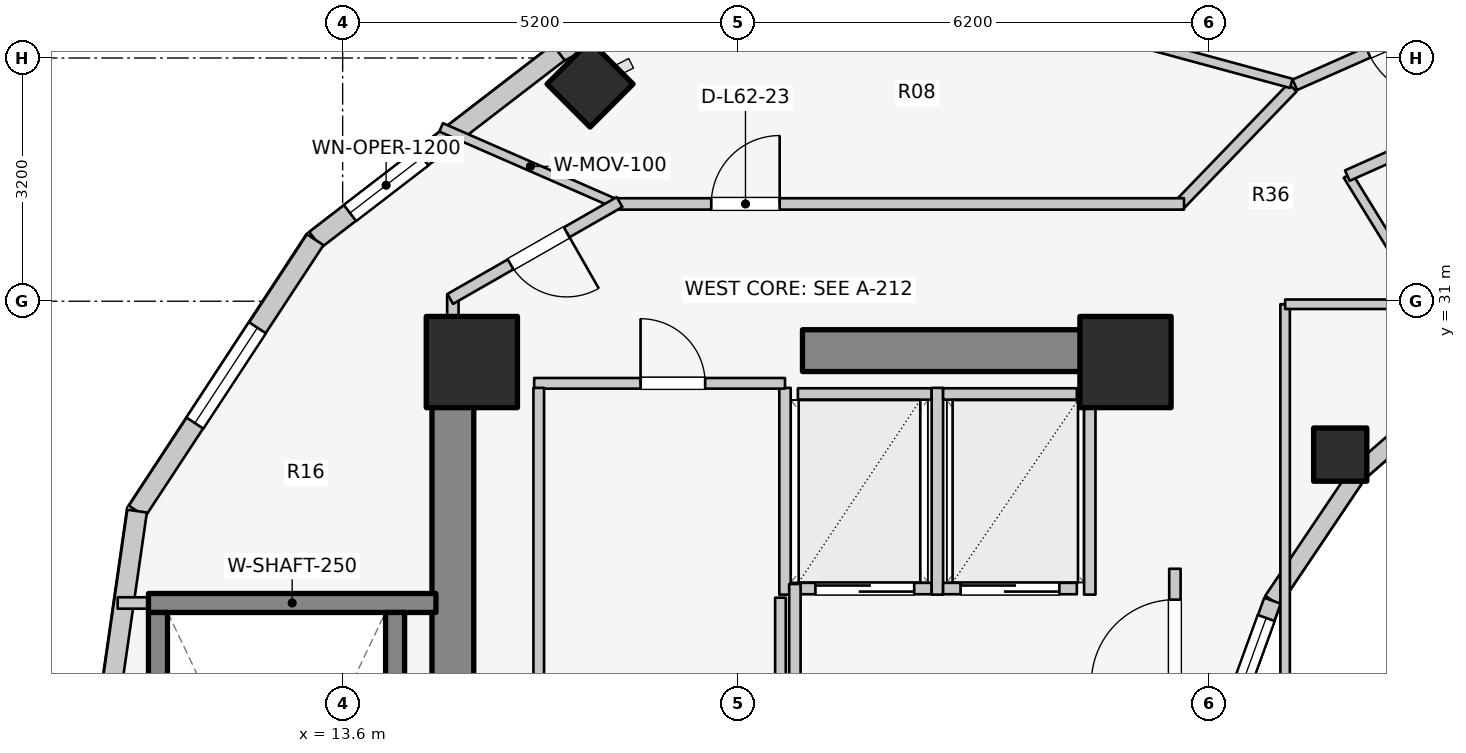
"""IFC4 building model, lengths in metres.
Left out: names, types, materials, properties, quantities, classifications, styles, units other than length and angle.
Written with IfcOpenShell. Run it as: python <this file> out.ifc"""

import sys

from ifc_helpers import new_model, si_unit, direction, frame, frame_2d, origin, origin_2d, place, context, subcontext, project, spatial, rectangle, extrude, element, fill, save


model = new_model("IFC4")
c1 = context("Model", 3, precision=1e-05, world=origin(), true_north=direction((0.0, 1.0)))
c2 = subcontext(c1, "Body", "Model", "MODEL_VIEW")
j1 = project(units=[si_unit("LENGTHUNIT", "METRE"), si_unit("PLANEANGLEUNIT", "RADIAN")], contexts=[c1])
p1 = place(None, origin())
s1 = spatial("IfcSite", under=j1, at=p1, CompositionType="ELEMENT")
p2 = place(p1, origin())
s2 = spatial("IfcBuilding", under=s1, at=p2, CompositionType="ELEMENT")
p3 = place(p2, frame((0.0, 0.0, 204.7)))
s3 = spatial("IfcBuildingStorey", under=s2, at=p3, CompositionType="ELEMENT", Elevation=204.7)
p4 = place(p3, frame((15.05, 17.05, 0.0), z_axis=(0.0, 0.0, 1.0), x_axis=(0.0, 1.0, 0.0)))
e1 = element("IfcWall", 1, at=p4, inside=s3, PredefinedType="SHEAR", context=c2, shape_type="SweptSolid", body=[
    extrude(rectangle(XDim=12.8, YDim=0.55, at=frame_2d((6.4, 0.0))), origin(), (0.0, 0.0, 1.0), 3.1),
])
p5 = place(p3, frame((19.65, 30.35, 0.0), z_axis=(0.0, 0.0, 1.0), x_axis=(1.0, 0.0, 0.0)))
e2 = element("IfcWall", 2, at=p5, inside=s3, PredefinedType="SHEAR", context=c2, shape_type="SweptSolid", body=[
    extrude(rectangle(XDim=4.5, YDim=0.55, at=frame_2d((2.25, 0.0))), origin(), (0.0, 0.0, 1.0), 3.1),
])
p6 = place(p3, frame((11.045, 27.03, 0.0), z_axis=(0.0, 0.0, 1.0), x_axis=(1.0, 0.0, 0.0)))
e3 = element("IfcWall", 3, at=p6, inside=s3, PredefinedType="SOLIDWALL", context=c2, shape_type="SweptSolid", body=[
    extrude(rectangle(XDim=3.782, YDim=0.25, at=frame_2d((1.891, 0.0))), origin(), (0.0, 0.0, 1.0), 3.1),
])
for number, where, z_axis, x_axis in (
    (4, (11.17, 19.095, 0.0), (0.0, 0.0, 1.0), (0.0, 1.0, 0.0)),
    (5, (14.29, 19.095, 0.0), (0.0, 0.0, 1.0), (0.0, 1.0, 0.0)),
):
    element("IfcWall", number, at=place(p3, frame(where, z_axis=z_axis, x_axis=x_axis)), inside=s3, PredefinedType="SOLIDWALL", context=c2, shape_type="SweptSolid", body=[
        extrude(rectangle(XDim=7.81, YDim=0.25, at=frame_2d((3.905, 0.0))), origin(), (0.0, 0.0, 1.0), 3.1),
    ])
for number, where, z_axis, x_axis in (
    (6, (23.9, 30.2, 0.0), (0.0, 0.0, 1.0), (1.0, 0.0, 0.0)),
    (7, (15.3, 30.2, 0.0), (0.0, 0.0, 1.0), (1.0, 0.0, 0.0)),
):
    element("IfcColumn", number, at=place(p3, frame(where, z_axis=z_axis, x_axis=x_axis)), inside=s3, PredefinedType="COLUMN", context=c2, shape_type="SweptSolid", body=[
        extrude(rectangle(XDim=1.2, YDim=1.2, at=origin_2d()), origin(), (0.0, 0.0, 1.0), 3.1),
    ])
p7 = place(p3, frame((26.725, 28.982, 0.0), z_axis=(0.0, 0.0, 1.0), x_axis=(1.0, 0.0, 0.0)))
e8 = element("IfcColumn", 8, at=p7, inside=s3, PredefinedType="COLUMN", context=c2, shape_type="SweptSolid", body=[
    extrude(rectangle(XDim=0.7, YDim=0.7, at=origin_2d()), origin(), (0.0, 0.0, 1.0), 3.1),
])
p8 = place(p3, frame((16.855, 33.857, 0.0), z_axis=(0.0, 0.0, 1.0), x_axis=(-0.707106781187, 0.707106781187, 0.0)))
e9 = element("IfcColumn", 9, at=p8, inside=s3, PredefinedType="COLUMN", context=c2, shape_type="SweptSolid", body=[
    extrude(rectangle(XDim=0.8, YDim=0.8, at=origin_2d()), origin(), (0.0, 0.0, 1.0), 3.1),
])
p9 = place(p3, frame((28.44, 30.032, 0.0), z_axis=(0.0, 0.0, 1.0), x_axis=(-0.752576694707, -0.658504607869, 0.0)))
e10 = element("IfcWall", 10, at=p9, inside=s3, PredefinedType="STANDARD", context=c2, shape_type="SweptSolid", body=[
    extrude(rectangle(XDim=1.959, YDim=0.23, at=frame_2d((0.98, 0.0))), origin(), (0.0, 0.0, 1.0), 2.16),
])
p10 = place(p3, frame((26.965, 28.742, 0.0), z_axis=(0.0, 0.0, 1.0), x_axis=(-0.558197800898, -0.829707909492, 0.0)))
e11 = element("IfcWall", 11, at=p10, inside=s3, PredefinedType="STANDARD", context=c2, shape_type="SweptSolid", body=[
    extrude(rectangle(XDim=2.027, YDim=0.23, at=frame_2d((1.013, 0.0))), origin(), (0.0, 0.0, 1.0), 2.16),
])
p11 = place(p3, frame((25.834, 27.06, 0.0), z_axis=(0.0, 0.0, 1.0), x_axis=(-0.341423187295, -0.93990968033, 0.0)))
e12 = element("IfcWall", 12, at=p11, inside=s3, PredefinedType="STANDARD", context=c2, shape_type="SweptSolid", body=[
    extrude(rectangle(XDim=2.084, YDim=0.23, at=frame_2d((1.042, 0.0))), origin(), (0.0, 0.0, 1.0), 2.84),
])
p12 = place(p11, frame((0.242, 0.0, 0.85)))
e13 = element("IfcOpeningElement", 13, at=p12, cuts=e12, PredefinedType="OPENING", context=c2, shape_type="SweptSolid", body=[
    extrude(rectangle(XDim=1.6, YDim=1.65, at=frame_2d((0.8, 0.825))), frame((0.0, 0.125, 0.0), z_axis=(0.0, -1.0, 0.0), x_axis=(1.0, 0.0, 0.0)), (0.0, 0.0, 1.0), 0.25),
])
p13 = place(p3, frame((20.13, 36.177, 0.0), z_axis=(0.0, 0.0, 1.0), x_axis=(-0.88849146803, -0.458893137057, 0.0)))
e14 = element("IfcWall", 14, at=p13, inside=s3, PredefinedType="STANDARD", context=c2, shape_type="SweptSolid", body=[
    extrude(rectangle(XDim=4.15, YDim=0.26, at=frame_2d((2.075, 0.0))), origin(), (0.0, 0.0, 1.0), 2.85),
])
p14 = place(p3, frame((16.442, 34.272, 0.0), z_axis=(0.0, 0.0, 1.0), x_axis=(-0.792713817907, -0.609593965603, 0.0)))
e15 = element("IfcWall", 15, at=p14, inside=s3, PredefinedType="STANDARD", context=c2, shape_type="SweptSolid", body=[
    extrude(rectangle(XDim=4.041, YDim=0.26, at=frame_2d((2.021, 0.0))), origin(), (0.0, 0.0, 1.0), 2.85),
])
p15 = place(p14, frame((2.264, 0.0, 0.75)))
e16 = element("IfcOpeningElement", 16, at=p15, cuts=e15, PredefinedType="OPENING", context=c2, shape_type="SweptSolid", body=[
    extrude(rectangle(XDim=1.2, YDim=1.5, at=frame_2d((0.6, 0.75))), frame((0.0, 0.14, 0.0), z_axis=(0.0, -1.0, 0.0), x_axis=(1.0, 0.0, 0.0)), (0.0, 0.0, 1.0), 0.28),
])
p16 = place(p3, frame((13.239, 31.809, 0.0), z_axis=(0.0, 0.0, 1.0), x_axis=(-0.548776305075, -0.835969238064, 0.0)))
e17 = element("IfcWall", 17, at=p16, inside=s3, PredefinedType="STANDARD", context=c2, shape_type="SweptSolid", body=[
    extrude(rectangle(XDim=4.271, YDim=0.26, at=frame_2d((2.135, 0.0))), origin(), (0.0, 0.0, 1.0), 2.85),
])
p17 = place(p16, frame((1.385, 0.0, 0.75)))
e18 = element("IfcOpeningElement", 18, at=p17, cuts=e17, PredefinedType="OPENING", context=c2, shape_type="SweptSolid", body=[
    extrude(rectangle(XDim=1.5, YDim=1.6, at=frame_2d((0.75, 0.8))), frame((0.0, 0.14, 0.0), z_axis=(0.0, -1.0, 0.0), x_axis=(1.0, 0.0, 0.0)), (0.0, 0.0, 1.0), 0.28),
])
p18 = place(p3, frame((10.895, 28.239, 0.0), z_axis=(0.0, 0.0, 1.0), x_axis=(-0.142712754019, -0.989764148593, 0.0)))
e19 = element("IfcWall", 19, at=p18, inside=s3, PredefinedType="STANDARD", context=c2, shape_type="SweptSolid", body=[
    extrude(rectangle(XDim=5.293, YDim=0.26, at=frame_2d((2.646, 0.0))), origin(), (0.0, 0.0, 1.0), 2.85),
])
p19 = place(p18, frame((2.635, 0.0, 0.75)))
e20 = element("IfcOpeningElement", 20, at=p19, cuts=e19, PredefinedType="OPENING", context=c2, shape_type="SweptSolid", body=[
    extrude(rectangle(XDim=1.2, YDim=1.5, at=frame_2d((0.6, 0.75))), frame((0.0, 0.14, 0.0), z_axis=(0.0, -1.0, 0.0), x_axis=(1.0, 0.0, 0.0)), (0.0, 0.0, 1.0), 0.28),
])
p20 = place(p3, frame((19.59, 27.22, 0.0), z_axis=(0.0, 0.0, 1.0), x_axis=(1.0, 0.0, 0.0)))
e21 = element("IfcWall", 21, at=p20, inside=s3, PredefinedType="SOLIDWALL", context=c2, shape_type="SweptSolid", body=[
    extrude(rectangle(XDim=1.76, YDim=0.15, at=frame_2d((0.88, 0.0))), origin(), (0.0, 0.0, 1.0), 2.855),
])
p21 = place(p20, frame((0.23, 0.0, 0.0)))
e22 = element("IfcOpeningElement", 22, at=p21, cuts=e21, PredefinedType="OPENING", context=c2, shape_type="SweptSolid", body=[
    extrude(rectangle(XDim=1.3, YDim=2.1, at=frame_2d((0.65, 1.05))), frame((0.0, 0.085, 0.0), z_axis=(0.0, -1.0, 0.0), x_axis=(1.0, 0.0, 0.0)), (0.0, 0.0, 1.0), 0.17),
])
p22 = place(p3, frame((19.59, 29.78, 0.0), z_axis=(0.0, 0.0, 1.0), x_axis=(1.0, 0.0, 0.0)))
e23 = element("IfcWall", 23, at=p22, inside=s3, PredefinedType="SOLIDWALL", context=c2, shape_type="SweptSolid", body=[
    extrude(rectangle(XDim=1.76, YDim=0.15, at=frame_2d((0.88, 0.0))), origin(), (0.0, 0.0, 1.0), 2.855),
])
for number, where, z_axis, x_axis in (
    (24, (19.42, 27.14, 0.0), (0.0, 0.0, 1.0), (0.0, 1.0, 0.0)),
    (25, (21.425, 27.14, 0.0), (0.0, 0.0, 1.0), (0.0, 1.0, 0.0)),
):
    element("IfcWall", number, at=place(p3, frame(where, z_axis=z_axis, x_axis=x_axis)), inside=s3, PredefinedType="SOLIDWALL", context=c2, shape_type="SweptSolid", body=[
        extrude(rectangle(XDim=2.72, YDim=0.15, at=frame_2d((1.36, 0.0))), origin(), (0.0, 0.0, 1.0), 2.855),
    ])
p23 = place(p3, frame((21.5, 27.22, 0.0), z_axis=(0.0, 0.0, 1.0), x_axis=(1.0, 0.0, 0.0)))
e26 = element("IfcWall", 26, at=p23, inside=s3, PredefinedType="SOLIDWALL", context=c2, shape_type="SweptSolid", body=[
    extrude(rectangle(XDim=1.76, YDim=0.15, at=frame_2d((0.88, 0.0))), origin(), (0.0, 0.0, 1.0), 2.855),
])
p24 = place(p23, frame((0.23, 0.0, 0.0)))
e27 = element("IfcOpeningElement", 27, at=p24, cuts=e26, PredefinedType="OPENING", context=c2, shape_type="SweptSolid", body=[
    extrude(rectangle(XDim=1.3, YDim=2.1, at=frame_2d((0.65, 1.05))), frame((0.0, 0.085, 0.0), z_axis=(0.0, -1.0, 0.0), x_axis=(1.0, 0.0, 0.0)), (0.0, 0.0, 1.0), 0.17),
])
p25 = place(p3, frame((21.5, 29.78, 0.0), z_axis=(0.0, 0.0, 1.0), x_axis=(1.0, 0.0, 0.0)))
e28 = element("IfcWall", 28, at=p25, inside=s3, PredefinedType="SOLIDWALL", context=c2, shape_type="SweptSolid", body=[
    extrude(rectangle(XDim=1.76, YDim=0.15, at=frame_2d((0.88, 0.0))), origin(), (0.0, 0.0, 1.0), 2.855),
])
p26 = place(p3, frame((23.43, 27.14, 0.0), z_axis=(0.0, 0.0, 1.0), x_axis=(0.0, 1.0, 0.0)))
e29 = element("IfcWall", 29, at=p26, inside=s3, PredefinedType="SOLIDWALL", context=c2, shape_type="SweptSolid", body=[
    extrude(rectangle(XDim=2.72, YDim=0.15, at=frame_2d((1.36, 0.0))), origin(), (0.0, 0.0, 1.0), 2.855),
])
p27 = place(p3, frame((19.55, 24.08, 0.0), z_axis=(0.0, 0.0, 1.0), x_axis=(0.0, 1.0, 0.0)))
e30 = element("IfcWall", 30, at=p27, inside=s3, PredefinedType="PARTITIONING", context=c2, shape_type="SweptSolid", body=[
    extrude(rectangle(XDim=3.2, YDim=0.15, at=frame_2d((1.6, 0.0))), origin(), (0.0, 0.0, 1.0), 2.855),
])
p28 = place(p3, frame((24.55, 24.08, 0.0), z_axis=(0.0, 0.0, 1.0), x_axis=(0.0, 1.0, 0.0)))
e31 = element("IfcWall", 31, at=p28, inside=s3, PredefinedType="PARTITIONING", context=c2, shape_type="SweptSolid", body=[
    extrude(rectangle(XDim=3.4, YDim=0.15, at=frame_2d((1.7, 0.0))), origin(), (0.0, 0.0, 1.0), 2.855),
])
p29 = place(p28, frame((1.894, 0.0, 0.0)))
e32 = element("IfcOpeningElement", 32, at=p29, cuts=e31, PredefinedType="OPENING", context=c2, shape_type="SweptSolid", body=[
    extrude(rectangle(XDim=1.1, YDim=2.1, at=frame_2d((0.55, 1.05))), frame((0.0, 0.085, 0.0), z_axis=(0.0, -1.0, 0.0), x_axis=(1.0, 0.0, 0.0)), (0.0, 0.0, 1.0), 0.17),
])
p30 = place(p3, frame((16.12, 29.92, 0.0), z_axis=(0.0, 0.0, 1.0), x_axis=(1.0, 0.0, 0.0)))
e33 = element("IfcWall", 33, at=p30, inside=s3, PredefinedType="PLUMBINGWALL", context=c2, shape_type="SweptSolid", body=[
    extrude(rectangle(XDim=3.3, YDim=0.14, at=frame_2d((1.65, 0.0))), origin(), (0.0, 0.0, 1.0), 2.855),
])
p31 = place(p30, frame((1.399, 0.0, 0.0)))
e34 = element("IfcOpeningElement", 34, at=p31, cuts=e33, PredefinedType="OPENING", context=c2, shape_type="SweptSolid", body=[
    extrude(rectangle(XDim=0.85, YDim=2.05, at=frame_2d((0.425, 1.025))), frame((0.0, 0.08, 0.0), z_axis=(0.0, -1.0, 0.0), x_axis=(1.0, 0.0, 0.0)), (0.0, 0.0, 1.0), 0.16),
])
p32 = place(p3, frame((16.18, 25.98, 0.0), z_axis=(0.0, 0.0, 1.0), x_axis=(0.0, 1.0, 0.0)))
e35 = element("IfcWall", 35, at=p32, inside=s3, PredefinedType="PLUMBINGWALL", context=c2, shape_type="SweptSolid", body=[
    extrude(rectangle(XDim=3.88, YDim=0.14, at=frame_2d((1.94, 0.0))), origin(), (0.0, 0.0, 1.0), 2.855),
])
p33 = place(p3, frame((19.36, 25.98, 0.0), z_axis=(0.0, 0.0, 1.0), x_axis=(0.0, 1.0, 0.0)))
e36 = element("IfcWall", 36, at=p33, inside=s3, PredefinedType="PLUMBINGWALL", context=c2, shape_type="SweptSolid", body=[
    extrude(rectangle(XDim=1.12, YDim=0.14, at=frame_2d((0.56, 0.0))), origin(), (0.0, 0.0, 1.0), 2.855),
])
p34 = place(p3, frame((28.45, 30.015, 0.0), z_axis=(0.0, 0.0, 1.0), x_axis=(-0.523992004803, 0.851723182086, 0.0)))
e37 = element("IfcWall", 37, at=p34, inside=s3, PredefinedType="PARTITIONING", context=c2, shape_type="SweptSolid", body=[
    extrude(rectangle(XDim=3.101, YDim=0.125, at=frame_2d((1.551, 0.0))), origin(), (0.0, 0.0, 1.0), 2.376),
])
p35 = place(p3, frame((29.323, 33.771, 0.0), z_axis=(0.0, 0.0, 1.0), x_axis=(-0.913120130558, -0.407690602257, 0.0)))
e38 = element("IfcWall", 38, at=p35, inside=s3, PredefinedType="PARTITIONING", context=c2, shape_type="SweptSolid", body=[
    extrude(rectangle(XDim=2.743, YDim=0.15, at=frame_2d((1.371, 0.0))), origin(), (0.0, 0.0, 1.0), 2.376),
])
p36 = place(p35, frame((0.896, 0.0, 0.0)))
e39 = element("IfcOpeningElement", 39, at=p36, cuts=e38, PredefinedType="OPENING", context=c2, shape_type="SweptSolid", body=[
    extrude(rectangle(XDim=0.95, YDim=2.1, at=frame_2d((0.475, 1.05))), frame((0.0, 0.085, 0.0), z_axis=(0.0, -1.0, 0.0), x_axis=(1.0, 0.0, 0.0)), (0.0, 0.0, 1.0), 0.17),
])
p37 = place(p3, frame((26.0, 25.8, 0.0), z_axis=(0.0, 0.0, 1.0), x_axis=(0.0, 1.0, 0.0)))
e40 = element("IfcWall", 40, at=p37, inside=s3, PredefinedType="PARTITIONING", context=c2, shape_type="SweptSolid", body=[
    extrude(rectangle(XDim=5.16, YDim=0.125, at=frame_2d((2.58, 0.0))), origin(), (0.0, 0.0, 1.0), 2.232),
])
p38 = place(p3, frame((26.0, 30.96, 0.0), z_axis=(0.0, 0.0, 1.0), x_axis=(1.0, 0.0, 0.0)))
e41 = element("IfcWall", 41, at=p38, inside=s3, PredefinedType="PARTITIONING", context=c2, shape_type="SweptSolid", body=[
    extrude(rectangle(XDim=2.6, YDim=0.125, at=frame_2d((1.3, 0.0))), origin(), (0.0, 0.0, 1.0), 2.376),
])
p39 = place(p3, frame((10.64, 27.03, 0.0), z_axis=(0.0, 0.0, 1.0), x_axis=(1.0, 0.0, 0.0)))
e42 = element("IfcWall", 42, at=p39, inside=s3, PredefinedType="PARTITIONING", context=c2, shape_type="SweptSolid", body=[
    extrude(rectangle(XDim=0.4, YDim=0.15, at=frame_2d((0.2, 0.0))), origin(), (0.0, 0.0, 1.0), 2.855),
])
p40 = place(p3, frame((15.05, 29.8, 0.0), z_axis=(0.0, 0.0, 1.0), x_axis=(0.0, 1.0, 0.0)))
e43 = element("IfcWall", 43, at=p40, inside=s3, PredefinedType="PARTITIONING", context=c2, shape_type="SweptSolid", body=[
    extrude(rectangle(XDim=1.29, YDim=0.15, at=frame_2d((0.645, 0.0))), origin(), (0.0, 0.0, 1.0), 2.855),
])
p41 = place(p3, frame((17.246, 32.26, 0.0), z_axis=(0.0, 0.0, 1.0), x_axis=(-0.916294929952, 0.400504183928, 0.0)))
e44 = element("IfcWall", 44, at=p41, inside=s3, PredefinedType="MOVABLE", context=c2, shape_type="SweptSolid", body=[
    extrude(rectangle(XDim=2.564, YDim=0.12, at=frame_2d((1.282, 0.0))), origin(), (0.0, 0.0, 1.0), 2.22),
])
p42 = place(p3, frame((26.097, 33.812, 0.0), z_axis=(0.0, 0.0, 1.0), x_axis=(-0.694032962553, -0.719943224768, 0.0)))
e45 = element("IfcWall", 45, at=p42, inside=s3, PredefinedType="PARTITIONING", context=c2, shape_type="SweptSolid", body=[
    extrude(rectangle(XDim=2.158, YDim=0.15, at=frame_2d((1.079, 0.0))), origin(), (0.0, 0.0, 1.0), 2.376),
])
p43 = place(p3, frame((17.15, 32.28, 0.0), z_axis=(0.0, 0.0, 1.0), x_axis=(1.0, 0.0, 0.0)))
e46 = element("IfcWall", 46, at=p43, inside=s3, PredefinedType="PARTITIONING", context=c2, shape_type="SweptSolid", body=[
    extrude(rectangle(XDim=7.52, YDim=0.15, at=frame_2d((3.76, 0.0))), origin(), (0.0, 0.0, 1.0), 2.376),
])
p44 = place(p43, frame((1.3, 0.0, 0.0)))
e47 = element("IfcOpeningElement", 47, at=p44, cuts=e46, PredefinedType="OPENING", context=c2, shape_type="SweptSolid", body=[
    extrude(rectangle(XDim=0.9, YDim=2.1, at=frame_2d((0.45, 1.05))), frame((0.0, 0.085, 0.0), z_axis=(0.0, -1.0, 0.0), x_axis=(1.0, 0.0, 0.0)), (0.0, 0.0, 1.0), 0.17),
])
p45 = place(p3, frame((17.243, 32.305, 0.0), z_axis=(0.0, 0.0, 1.0), x_axis=(-0.867991349648, -0.496579315857, 0.0)))
e48 = element("IfcWall", 48, at=p45, inside=s3, PredefinedType="PARTITIONING", context=c2, shape_type="SweptSolid", body=[
    extrude(rectangle(XDim=2.567, YDim=0.15, at=frame_2d((1.283, 0.0))), origin(), (0.0, 0.0, 1.0), 2.22),
])
p46 = place(p45, frame((0.802, 0.0, 0.0)))
e49 = element("IfcOpeningElement", 49, at=p46, cuts=e48, PredefinedType="OPENING", context=c2, shape_type="SweptSolid", body=[
    extrude(rectangle(XDim=0.85, YDim=2.05, at=frame_2d((0.425, 1.025))), frame((0.0, 0.085, 0.0), z_axis=(0.0, -1.0, 0.0), x_axis=(1.0, 0.0, 0.0)), (0.0, 0.0, 1.0), 0.17),
])
p47 = place(p3, frame((26.082, 33.866, 0.0), z_axis=(0.0, 0.0, 1.0), x_axis=(-0.965109390289, 0.261847025523, 0.0)))
e50 = element("IfcWall", 50, at=p47, inside=s3, PredefinedType="PARTITIONING", context=c2, shape_type="SweptSolid", body=[
    extrude(rectangle(XDim=5.644, YDim=0.125, at=frame_2d((2.822, 0.0))), origin(), (0.0, 0.0, 1.0), 2.376),
])
p48 = place(p3, frame((28.972, 35.105, 0.0), z_axis=(0.0, 0.0, 1.0), x_axis=(-0.914490094652, -0.40460828808, 0.0)))
e51 = element("IfcWall", 51, at=p48, inside=s3, PredefinedType="PARTITIONING", context=c2, shape_type="SweptSolid", body=[
    extrude(rectangle(XDim=3.11, YDim=0.15, at=frame_2d((1.555, 0.0))), origin(), (0.0, 0.0, 1.0), 2.376),
])
p49 = place(p48, frame((1.055, 0.0, 0.0)))
e52 = element("IfcOpeningElement", 52, at=p49, cuts=e51, PredefinedType="OPENING", context=c2, shape_type="SweptSolid", body=[
    extrude(rectangle(XDim=1.0, YDim=2.1, at=frame_2d((0.5, 1.05))), frame((0.0, 0.085, 0.0), z_axis=(0.0, -1.0, 0.0), x_axis=(1.0, 0.0, 0.0)), (0.0, 0.0, 1.0), 0.17),
])
p50 = place(p12, origin())
e53 = element("IfcWindow", 53, at=p50, inside=s3, PartitioningType="SINGLE_PANEL", PredefinedType="WINDOW", context=c2, shape_type="SweptSolid", body=[
    extrude(rectangle(XDim=1.6, YDim=1.65, at=frame_2d((0.8, 0.825))), frame((0.0, 0.03, 0.0), z_axis=(0.0, -1.0, 0.0), x_axis=(1.0, 0.0, 0.0)), (0.0, 0.0, 1.0), 0.06),
])
fill(e13, e53)
p51 = place(p15, origin())
e54 = element("IfcWindow", 54, at=p51, inside=s3, PartitioningType="SINGLE_PANEL", PredefinedType="WINDOW", context=c2, shape_type="SweptSolid", body=[
    extrude(rectangle(XDim=1.2, YDim=1.5, at=frame_2d((0.6, 0.75))), frame((0.0, 0.03, 0.0), z_axis=(0.0, -1.0, 0.0), x_axis=(1.0, 0.0, 0.0)), (0.0, 0.0, 1.0), 0.06),
])
fill(e16, e54)
p52 = place(p17, origin())
e55 = element("IfcWindow", 55, at=p52, inside=s3, PartitioningType="SINGLE_PANEL", PredefinedType="WINDOW", context=c2, shape_type="SweptSolid", body=[
    extrude(rectangle(XDim=1.5, YDim=1.6, at=frame_2d((0.75, 0.8))), frame((0.0, 0.03, 0.0), z_axis=(0.0, -1.0, 0.0), x_axis=(1.0, 0.0, 0.0)), (0.0, 0.0, 1.0), 0.06),
])
fill(e18, e55)
p53 = place(p21, origin())
e56 = element("IfcDoor", 56, at=p53, inside=s3, OperationType="DOUBLE_DOOR_SLIDING", PredefinedType="DOOR", context=c2, shape_type="SweptSolid", body=[
    extrude(rectangle(XDim=1.3, YDim=2.1, at=frame_2d((0.65, 1.05))), frame((0.0, 0.025, 0.0), z_axis=(0.0, -1.0, 0.0), x_axis=(1.0, 0.0, 0.0)), (0.0, 0.0, 1.0), 0.05),
])
fill(e22, e56)
p54 = place(p24, origin())
e57 = element("IfcDoor", 57, at=p54, inside=s3, OperationType="DOUBLE_DOOR_SLIDING", PredefinedType="DOOR", context=c2, shape_type="SweptSolid", body=[
    extrude(rectangle(XDim=1.3, YDim=2.1, at=frame_2d((0.65, 1.05))), frame((0.0, 0.025, 0.0), z_axis=(0.0, -1.0, 0.0), x_axis=(1.0, 0.0, 0.0)), (0.0, 0.0, 1.0), 0.05),
])
fill(e27, e57)
p55 = place(p29, origin())
e58 = element("IfcDoor", 58, at=p55, inside=s3, OperationType="SINGLE_SWING_LEFT", PredefinedType="DOOR", context=c2, shape_type="SweptSolid", body=[
    extrude(rectangle(XDim=1.1, YDim=2.1, at=frame_2d((0.55, 1.05))), frame((0.0, 0.025, 0.0), z_axis=(0.0, -1.0, 0.0), x_axis=(1.0, 0.0, 0.0)), (0.0, 0.0, 1.0), 0.05),
])
fill(e32, e58)
p56 = place(p31, origin())
e59 = element("IfcDoor", 59, at=p56, inside=s3, OperationType="SINGLE_SWING_LEFT", PredefinedType="DOOR", context=c2, shape_type="SweptSolid", body=[
    extrude(rectangle(XDim=0.85, YDim=2.05, at=frame_2d((0.425, 1.025))), frame((0.0, 0.025, 0.0), z_axis=(0.0, -1.0, 0.0), x_axis=(1.0, 0.0, 0.0)), (0.0, 0.0, 1.0), 0.05),
])
fill(e34, e59)
p57 = place(p44, origin())
e60 = element("IfcDoor", 60, at=p57, inside=s3, OperationType="SINGLE_SWING_RIGHT", PredefinedType="DOOR", context=c2, shape_type="SweptSolid", body=[
    extrude(rectangle(XDim=0.9, YDim=2.1, at=frame_2d((0.45, 1.05))), frame((0.0, 0.025, 0.0), z_axis=(0.0, -1.0, 0.0), x_axis=(1.0, 0.0, 0.0)), (0.0, 0.0, 1.0), 0.05),
])
fill(e47, e60)
p58 = place(p46, origin())
e61 = element("IfcDoor", 61, at=p58, inside=s3, OperationType="SINGLE_SWING_LEFT", PredefinedType="DOOR", context=c2, shape_type="SweptSolid", body=[
    extrude(rectangle(XDim=0.85, YDim=2.05, at=frame_2d((0.425, 1.025))), frame((0.0, 0.025, 0.0), z_axis=(0.0, -1.0, 0.0), x_axis=(1.0, 0.0, 0.0)), (0.0, 0.0, 1.0), 0.05),
])
fill(e49, e61)
p59 = place(p49, origin())
e62 = element("IfcDoor", 62, at=p59, inside=s3, OperationType="SINGLE_SWING_LEFT", PredefinedType="DOOR", context=c2, shape_type="SweptSolid", body=[
    extrude(rectangle(XDim=1.0, YDim=2.1, at=frame_2d((0.5, 1.05))), frame((0.0, 0.025, 0.0), z_axis=(0.0, -1.0, 0.0), x_axis=(1.0, 0.0, 0.0)), (0.0, 0.0, 1.0), 0.05),
])
fill(e52, e62)
save(model, sys.argv[1])
